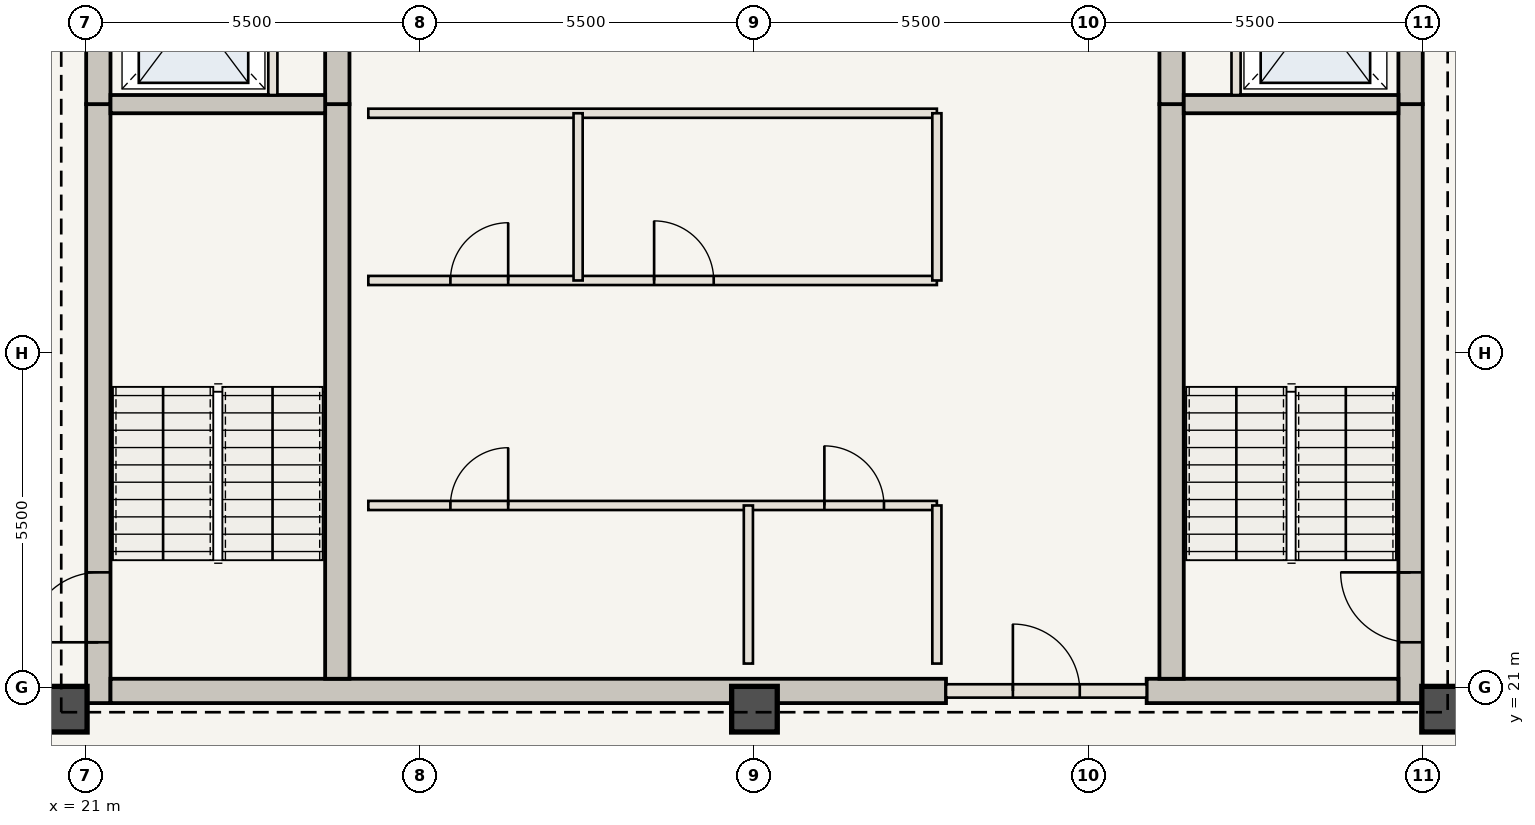
"""IFC4 building model, lengths in metres.
Left out: names, types, materials, properties, quantities, classifications, styles, units other than length and angle.
Written with IfcOpenShell. Run it as: python <this file> out.ifc"""

import sys

from ifc_helpers import new_model, si_unit, direction, frame, frame_2d, origin, origin_2d, place, context, subcontext, project, spatial, rectangle, extrude, element, fill, save


model = new_model("IFC4")
c1 = context("Model", 3, precision=1e-05, world=origin(), true_north=direction((0.0, 1.0)))
c2 = subcontext(c1, "Body", "Model", "MODEL_VIEW")
j1 = project(units=[si_unit("LENGTHUNIT", "METRE"), si_unit("PLANEANGLEUNIT", "RADIAN")], contexts=[c1])
p1 = place(None, origin())
s1 = spatial("IfcSite", under=j1, at=p1, CompositionType="ELEMENT")
p2 = place(p1, origin())
s2 = spatial("IfcBuilding", under=s1, at=p2, CompositionType="ELEMENT")
p3 = place(p2, frame((0.0, 0.0, 296.8)))
s3 = spatial("IfcBuildingStorey", under=s2, at=p3, CompositionType="ELEMENT", Elevation=296.8)
p4 = place(p3, frame((21.21, 20.75, 0.0), z_axis=(0.0, 0.0, 1.0), x_axis=(0.0, 1.0, 0.0)))
e1 = element("IfcWall", 1, at=p4, inside=s3, PredefinedType="SHEAR", context=c2, shape_type="SweptSolid", body=[
    extrude(rectangle(XDim=9.85, YDim=0.4, at=frame_2d((4.925, 0.0))), origin(), (0.0, 0.0, 1.0), 3.85),
])
p5 = place(p4, frame((1.0, 0.0, 0.0)))
e2 = element("IfcOpeningElement", 2, at=p5, cuts=e1, PredefinedType="OPENING", context=c2, shape_type="SweptSolid", body=[
    extrude(rectangle(XDim=1.15, YDim=2.15, at=frame_2d((0.575, 1.075))), frame((0.0, 0.21, 0.0), z_axis=(0.0, -1.0, 0.0), x_axis=(1.0, 0.0, 0.0)), (0.0, 0.0, 1.0), 0.42),
])
p6 = place(p3, frame((21.21, 30.6, 0.0), z_axis=(0.0, 0.0, 1.0), x_axis=(0.0, 1.0, 0.0)))
e3 = element("IfcWall", 3, at=p6, inside=s3, PredefinedType="SHEAR", context=c2, shape_type="SweptSolid", body=[
    extrude(rectangle(XDim=12.6, YDim=0.4, at=frame_2d((6.3, 0.0))), origin(), (0.0, 0.0, 1.0), 3.85),
])
p7 = place(p6, frame((4.2, 0.0, 0.0)))
e4 = element("IfcOpeningElement", 4, at=p7, cuts=e3, PredefinedType="OPENING", context=c2, shape_type="SweptSolid", body=[
    extrude(rectangle(XDim=1.1, YDim=2.15, at=frame_2d((0.55, 1.075))), frame((0.0, 0.21, 0.0), z_axis=(0.0, -1.0, 0.0), x_axis=(1.0, 0.0, 0.0)), (0.0, 0.0, 1.0), 0.42),
])
p8 = place(p6, frame((8.05, 0.0, 0.0)))
e5 = element("IfcOpeningElement", 5, at=p8, cuts=e3, PredefinedType="OPENING", context=c2, shape_type="SweptSolid", body=[
    extrude(rectangle(XDim=0.92, YDim=2.1, at=frame_2d((0.46, 1.05))), frame((0.0, 0.21, 0.0), z_axis=(0.0, -1.0, 0.0), x_axis=(1.0, 0.0, 0.0)), (0.0, 0.0, 1.0), 0.42),
])
p9 = place(p6, frame((9.45, 0.0, 0.0)))
e6 = element("IfcOpeningElement", 6, at=p9, cuts=e3, PredefinedType="OPENING", context=c2, shape_type="SweptSolid", body=[
    extrude(rectangle(XDim=0.88, YDim=2.1, at=frame_2d((0.44, 1.05))), frame((0.0, 0.21, 0.0), z_axis=(0.0, -1.0, 0.0), x_axis=(1.0, 0.0, 0.0)), (0.0, 0.0, 1.0), 0.42),
])
p10 = place(p6, frame((10.85, 0.0, 0.0)))
e7 = element("IfcOpeningElement", 7, at=p10, cuts=e3, PredefinedType="OPENING", context=c2, shape_type="SweptSolid", body=[
    extrude(rectangle(XDim=0.88, YDim=2.1, at=frame_2d((0.44, 1.05))), frame((0.0, 0.21, 0.0), z_axis=(0.0, -1.0, 0.0), x_axis=(1.0, 0.0, 0.0)), (0.0, 0.0, 1.0), 0.42),
])
p11 = place(p3, frame((42.79, 20.75, 0.0), z_axis=(0.0, 0.0, 1.0), x_axis=(0.0, 1.0, 0.0)))
e8 = element("IfcWall", 8, at=p11, inside=s3, PredefinedType="SHEAR", context=c2, shape_type="SweptSolid", body=[
    extrude(rectangle(XDim=9.85, YDim=0.4, at=frame_2d((4.925, 0.0))), origin(), (0.0, 0.0, 1.0), 3.85),
])
p12 = place(p11, frame((1.0, 0.0, 0.0)))
e9 = element("IfcOpeningElement", 9, at=p12, cuts=e8, PredefinedType="OPENING", context=c2, shape_type="SweptSolid", body=[
    extrude(rectangle(XDim=1.15, YDim=2.15, at=frame_2d((0.575, 1.075))), frame((0.0, 0.21, 0.0), z_axis=(0.0, -1.0, 0.0), x_axis=(1.0, 0.0, 0.0)), (0.0, 0.0, 1.0), 0.42),
])
p13 = place(p3, frame((42.79, 30.6, 0.0), z_axis=(0.0, 0.0, 1.0), x_axis=(0.0, 1.0, 0.0)))
e10 = element("IfcWall", 10, at=p13, inside=s3, PredefinedType="SHEAR", context=c2, shape_type="SweptSolid", body=[
    extrude(rectangle(XDim=12.6, YDim=0.4, at=frame_2d((6.3, 0.0))), origin(), (0.0, 0.0, 1.0), 3.85),
])
p14 = place(p13, frame((4.2, 0.0, 0.0)))
e11 = element("IfcOpeningElement", 11, at=p14, cuts=e10, PredefinedType="OPENING", context=c2, shape_type="SweptSolid", body=[
    extrude(rectangle(XDim=1.1, YDim=2.15, at=frame_2d((0.55, 1.075))), frame((0.0, 0.21, 0.0), z_axis=(0.0, -1.0, 0.0), x_axis=(1.0, 0.0, 0.0)), (0.0, 0.0, 1.0), 0.42),
])
p15 = place(p13, frame((9.2, 0.0, 0.0)))
e12 = element("IfcOpeningElement", 12, at=p15, cuts=e10, PredefinedType="OPENING", context=c2, shape_type="SweptSolid", body=[
    extrude(rectangle(XDim=0.92, YDim=2.1, at=frame_2d((0.46, 1.05))), frame((0.0, 0.21, 0.0), z_axis=(0.0, -1.0, 0.0), x_axis=(1.0, 0.0, 0.0)), (0.0, 0.0, 1.0), 0.42),
])
p16 = place(p3, frame((21.41, 20.95, 0.0), z_axis=(0.0, 0.0, 1.0), x_axis=(1.0, 0.0, 0.0)))
e13 = element("IfcWall", 13, at=p16, inside=s3, PredefinedType="SHEAR", context=c2, shape_type="SweptSolid", body=[
    extrude(rectangle(XDim=13.74, YDim=0.4, at=frame_2d((6.87, 0.0))), origin(), (0.0, 0.0, 1.0), 3.85),
])
p17 = place(p3, frame((38.45, 20.95, 0.0), z_axis=(0.0, 0.0, 1.0), x_axis=(1.0, 0.0, 0.0)))
e14 = element("IfcWall", 14, at=p17, inside=s3, PredefinedType="SHEAR", context=c2, shape_type="SweptSolid", body=[
    extrude(rectangle(XDim=4.14, YDim=0.4, at=frame_2d((2.07, 0.0))), origin(), (0.0, 0.0, 1.0), 3.85),
])
p18 = place(p3, frame((25.14, 21.15, 0.0), z_axis=(0.0, 0.0, 1.0), x_axis=(0.0, 1.0, 0.0)))
e15 = element("IfcWall", 15, at=p18, inside=s3, PredefinedType="SHEAR", context=c2, shape_type="SweptSolid", body=[
    extrude(rectangle(XDim=9.45, YDim=0.4, at=frame_2d((4.725, 0.0))), origin(), (0.0, 0.0, 1.0), 3.85),
])
p19 = place(p3, frame((25.14, 30.6, 0.0), z_axis=(0.0, 0.0, 1.0), x_axis=(0.0, 1.0, 0.0)))
e16 = element("IfcWall", 16, at=p19, inside=s3, PredefinedType="SHEAR", context=c2, shape_type="SweptSolid", body=[
    extrude(rectangle(XDim=12.2, YDim=0.4, at=frame_2d((6.1, 0.0))), origin(), (0.0, 0.0, 1.0), 3.85),
])
p20 = place(p19, frame((6.25, 0.0, 0.0)))
e17 = element("IfcOpeningElement", 17, at=p20, cuts=e16, PredefinedType="OPENING", context=c2, shape_type="SweptSolid", body=[
    extrude(rectangle(XDim=1.1, YDim=2.15, at=frame_2d((0.55, 1.075))), frame((0.0, 0.21, 0.0), z_axis=(0.0, -1.0, 0.0), x_axis=(1.0, 0.0, 0.0)), (0.0, 0.0, 1.0), 0.42),
])
p21 = place(p3, frame((38.86, 21.15, 0.0), z_axis=(0.0, 0.0, 1.0), x_axis=(0.0, 1.0, 0.0)))
e18 = element("IfcWall", 18, at=p21, inside=s3, PredefinedType="SHEAR", context=c2, shape_type="SweptSolid", body=[
    extrude(rectangle(XDim=9.45, YDim=0.4, at=frame_2d((4.725, 0.0))), origin(), (0.0, 0.0, 1.0), 3.85),
])
p22 = place(p3, frame((38.86, 30.6, 0.0), z_axis=(0.0, 0.0, 1.0), x_axis=(0.0, 1.0, 0.0)))
e19 = element("IfcWall", 19, at=p22, inside=s3, PredefinedType="SHEAR", context=c2, shape_type="SweptSolid", body=[
    extrude(rectangle(XDim=12.2, YDim=0.4, at=frame_2d((6.1, 0.0))), origin(), (0.0, 0.0, 1.0), 3.85),
])
for number, where, z_axis, x_axis in (
    (20, (20.65, 20.65, 0.0), (0.0, 0.0, 1.0), (1.0, 0.0, 0.0)),
    (21, (32.0, 20.65, 0.0), (0.0, 0.0, 1.0), (1.0, 0.0, 0.0)),
    (22, (43.35, 20.65, 0.0), (0.0, 0.0, 1.0), (1.0, 0.0, 0.0)),
):
    element("IfcColumn", number, at=place(p3, frame(where, z_axis=z_axis, x_axis=x_axis)), inside=s3, PredefinedType="COLUMN", context=c2, shape_type="SweptSolid", body=[
        extrude(rectangle(XDim=0.75, YDim=0.75, at=origin_2d()), origin(), (0.0, 0.0, 1.0), 3.85),
    ])
for number, where, z_axis, x_axis in (
    (23, (21.41, 30.6, 0.0), (0.0, 0.0, 1.0), (1.0, 0.0, 0.0)),
    (24, (39.06, 30.6, 0.0), (0.0, 0.0, 1.0), (1.0, 0.0, 0.0)),
):
    element("IfcWall", number, at=place(p3, frame(where, z_axis=z_axis, x_axis=x_axis)), inside=s3, PredefinedType="SHEAR", context=c2, shape_type="SweptSolid", body=[
        extrude(rectangle(XDim=3.53, YDim=0.3, at=frame_2d((1.765, 0.0))), origin(), (0.0, 0.0, 1.0), 3.685),
    ])
for number, where, z_axis, x_axis in (
    (25, (24.08, 30.75, 0.0), (0.0, 0.0, 1.0), (0.0, 1.0, 0.0)),
    (26, (39.92, 30.75, 0.0), (0.0, 0.0, 1.0), (0.0, 1.0, 0.0)),
):
    element("IfcWall", number, at=place(p3, frame(where, z_axis=z_axis, x_axis=x_axis)), inside=s3, PredefinedType="STANDARD", context=c2, shape_type="SweptSolid", body=[
        extrude(rectangle(XDim=2.65, YDim=0.15, at=frame_2d((1.325, 0.0))), origin(), (0.0, 0.0, 1.0), 3.685),
    ])
p23 = place(p3, frame((35.15, 20.95, 0.0), z_axis=(0.0, 0.0, 1.0), x_axis=(1.0, 0.0, 0.0)))
e27 = element("IfcWall", 27, at=p23, inside=s3, PredefinedType="STANDARD", context=c2, shape_type="SweptSolid", body=[
    extrude(rectangle(XDim=3.3, YDim=0.22, at=frame_2d((1.65, 0.0))), origin(), (0.0, 0.0, 1.0), 3.685),
])
p24 = place(p23, frame((1.1, 0.0, 0.0)))
e28 = element("IfcOpeningElement", 28, at=p24, cuts=e27, PredefinedType="OPENING", context=c2, shape_type="SweptSolid", body=[
    extrude(rectangle(XDim=1.1, YDim=2.15, at=frame_2d((0.55, 1.075))), frame((0.0, 0.12, 0.0), z_axis=(0.0, -1.0, 0.0), x_axis=(1.0, 0.0, 0.0)), (0.0, 0.0, 1.0), 0.24),
])
p25 = place(p3, frame((25.65, 24.0, 0.0), z_axis=(0.0, 0.0, 1.0), x_axis=(1.0, 0.0, 0.0)))
e29 = element("IfcWall", 29, at=p25, inside=s3, PredefinedType="STANDARD", context=c2, shape_type="SweptSolid", body=[
    extrude(rectangle(XDim=9.35, YDim=0.15, at=frame_2d((4.675, 0.0))), origin(), (0.0, 0.0, 1.0), 3.685),
])
p26 = place(p25, frame((1.35, 0.0, 0.0)))
e30 = element("IfcOpeningElement", 30, at=p26, cuts=e29, PredefinedType="OPENING", context=c2, shape_type="SweptSolid", body=[
    extrude(rectangle(XDim=0.95, YDim=2.15, at=frame_2d((0.475, 1.075))), frame((0.0, 0.085, 0.0), z_axis=(0.0, -1.0, 0.0), x_axis=(1.0, 0.0, 0.0)), (0.0, 0.0, 1.0), 0.17),
])
p27 = place(p25, frame((7.5, 0.0, 0.0)))
e31 = element("IfcOpeningElement", 31, at=p27, cuts=e29, PredefinedType="OPENING", context=c2, shape_type="SweptSolid", body=[
    extrude(rectangle(XDim=0.98, YDim=2.2, at=frame_2d((0.49, 1.1))), frame((0.0, 0.085, 0.0), z_axis=(0.0, -1.0, 0.0), x_axis=(1.0, 0.0, 0.0)), (0.0, 0.0, 1.0), 0.17),
])
for number, where, z_axis, x_axis in (
    (32, (31.9, 21.4, 0.0), (0.0, 0.0, 1.0), (0.0, 1.0, 0.0)),
    (33, (35.0, 21.4, 0.0), (0.0, 0.0, 1.0), (0.0, 1.0, 0.0)),
):
    element("IfcWall", number, at=place(p3, frame(where, z_axis=z_axis, x_axis=x_axis)), inside=s3, PredefinedType="STANDARD", context=c2, shape_type="SweptSolid", body=[
        extrude(rectangle(XDim=2.6, YDim=0.15, at=frame_2d((1.3, 0.0))), origin(), (0.0, 0.0, 1.0), 3.685),
    ])
p28 = place(p3, frame((25.65, 27.7, 0.0), z_axis=(0.0, 0.0, 1.0), x_axis=(1.0, 0.0, 0.0)))
e34 = element("IfcWall", 34, at=p28, inside=s3, PredefinedType="STANDARD", context=c2, shape_type="SweptSolid", body=[
    extrude(rectangle(XDim=9.35, YDim=0.15, at=frame_2d((4.675, 0.0))), origin(), (0.0, 0.0, 1.0), 3.685),
])
p29 = place(p28, frame((1.35, 0.0, 0.0)))
e35 = element("IfcOpeningElement", 35, at=p29, cuts=e34, PredefinedType="OPENING", context=c2, shape_type="SweptSolid", body=[
    extrude(rectangle(XDim=0.95, YDim=2.15, at=frame_2d((0.475, 1.075))), frame((0.0, 0.085, 0.0), z_axis=(0.0, -1.0, 0.0), x_axis=(1.0, 0.0, 0.0)), (0.0, 0.0, 1.0), 0.17),
])
p30 = place(p28, frame((4.7, 0.0, 0.0)))
e36 = element("IfcOpeningElement", 36, at=p30, cuts=e34, PredefinedType="OPENING", context=c2, shape_type="SweptSolid", body=[
    extrude(rectangle(XDim=0.98, YDim=2.2, at=frame_2d((0.49, 1.1))), frame((0.0, 0.085, 0.0), z_axis=(0.0, -1.0, 0.0), x_axis=(1.0, 0.0, 0.0)), (0.0, 0.0, 1.0), 0.17),
])
p31 = place(p3, frame((25.65, 30.45, 0.0), z_axis=(0.0, 0.0, 1.0), x_axis=(1.0, 0.0, 0.0)))
e37 = element("IfcWall", 37, at=p31, inside=s3, PredefinedType="STANDARD", context=c2, shape_type="SweptSolid", body=[
    extrude(rectangle(XDim=9.35, YDim=0.15, at=frame_2d((4.675, 0.0))), origin(), (0.0, 0.0, 1.0), 3.685),
])
for number, where, z_axis, x_axis in (
    (38, (29.1, 27.7, 0.0), (0.0, 0.0, 1.0), (0.0, 1.0, 0.0)),
    (39, (35.0, 27.7, 0.0), (0.0, 0.0, 1.0), (0.0, 1.0, 0.0)),
):
    element("IfcWall", number, at=place(p3, frame(where, z_axis=z_axis, x_axis=x_axis)), inside=s3, PredefinedType="STANDARD", context=c2, shape_type="SweptSolid", body=[
        extrude(rectangle(XDim=2.75, YDim=0.15, at=frame_2d((1.375, 0.0))), origin(), (0.0, 0.0, 1.0), 3.685),
    ])
p32 = place(p5, origin())
e40 = element("IfcDoor", 40, at=p32, inside=s3, OperationType="SINGLE_SWING_LEFT", PredefinedType="DOOR", context=c2, shape_type="SweptSolid", body=[
    extrude(rectangle(XDim=1.15, YDim=2.15, at=frame_2d((0.575, 1.075))), frame((0.0, 0.025, 0.0), z_axis=(0.0, -1.0, 0.0), x_axis=(1.0, 0.0, 0.0)), (0.0, 0.0, 1.0), 0.05),
])
fill(e2, e40)
p33 = place(p12, origin())
e41 = element("IfcDoor", 41, at=p33, inside=s3, OperationType="SINGLE_SWING_RIGHT", PredefinedType="DOOR", context=c2, shape_type="SweptSolid", body=[
    extrude(rectangle(XDim=1.15, YDim=2.15, at=frame_2d((0.575, 1.075))), frame((0.0, 0.025, 0.0), z_axis=(0.0, -1.0, 0.0), x_axis=(1.0, 0.0, 0.0)), (0.0, 0.0, 1.0), 0.05),
])
fill(e9, e41)
p34 = place(p24, origin())
e42 = element("IfcDoor", 42, at=p34, inside=s3, OperationType="SINGLE_SWING_LEFT", PredefinedType="DOOR", context=c2, shape_type="SweptSolid", body=[
    extrude(rectangle(XDim=1.1, YDim=2.15, at=frame_2d((0.55, 1.075))), frame((0.0, 0.025, 0.0), z_axis=(0.0, -1.0, 0.0), x_axis=(1.0, 0.0, 0.0)), (0.0, 0.0, 1.0), 0.05),
])
fill(e28, e42)
p35 = place(p26, origin())
e43 = element("IfcDoor", 43, at=p35, inside=s3, OperationType="SINGLE_SWING_RIGHT", PredefinedType="DOOR", context=c2, shape_type="SweptSolid", body=[
    extrude(rectangle(XDim=0.95, YDim=2.15, at=frame_2d((0.475, 1.075))), frame((0.0, 0.025, 0.0), z_axis=(0.0, -1.0, 0.0), x_axis=(1.0, 0.0, 0.0)), (0.0, 0.0, 1.0), 0.05),
])
fill(e30, e43)
p36 = place(p27, origin())
e44 = element("IfcDoor", 44, at=p36, inside=s3, OperationType="SINGLE_SWING_LEFT", PredefinedType="DOOR", context=c2, shape_type="SweptSolid", body=[
    extrude(rectangle(XDim=0.98, YDim=2.2, at=frame_2d((0.49, 1.1))), frame((0.0, 0.025, 0.0), z_axis=(0.0, -1.0, 0.0), x_axis=(1.0, 0.0, 0.0)), (0.0, 0.0, 1.0), 0.05),
])
fill(e31, e44)
p37 = place(p29, origin())
e45 = element("IfcDoor", 45, at=p37, inside=s3, OperationType="SINGLE_SWING_RIGHT", PredefinedType="DOOR", context=c2, shape_type="SweptSolid", body=[
    extrude(rectangle(XDim=0.95, YDim=2.15, at=frame_2d((0.475, 1.075))), frame((0.0, 0.025, 0.0), z_axis=(0.0, -1.0, 0.0), x_axis=(1.0, 0.0, 0.0)), (0.0, 0.0, 1.0), 0.05),
])
fill(e35, e45)
p38 = place(p30, origin())
e46 = element("IfcDoor", 46, at=p38, inside=s3, OperationType="SINGLE_SWING_LEFT", PredefinedType="DOOR", context=c2, shape_type="SweptSolid", body=[
    extrude(rectangle(XDim=0.98, YDim=2.2, at=frame_2d((0.49, 1.1))), frame((0.0, 0.025, 0.0), z_axis=(0.0, -1.0, 0.0), x_axis=(1.0, 0.0, 0.0)), (0.0, 0.0, 1.0), 0.05),
])
fill(e36, e46)
save(model, sys.argv[1])
